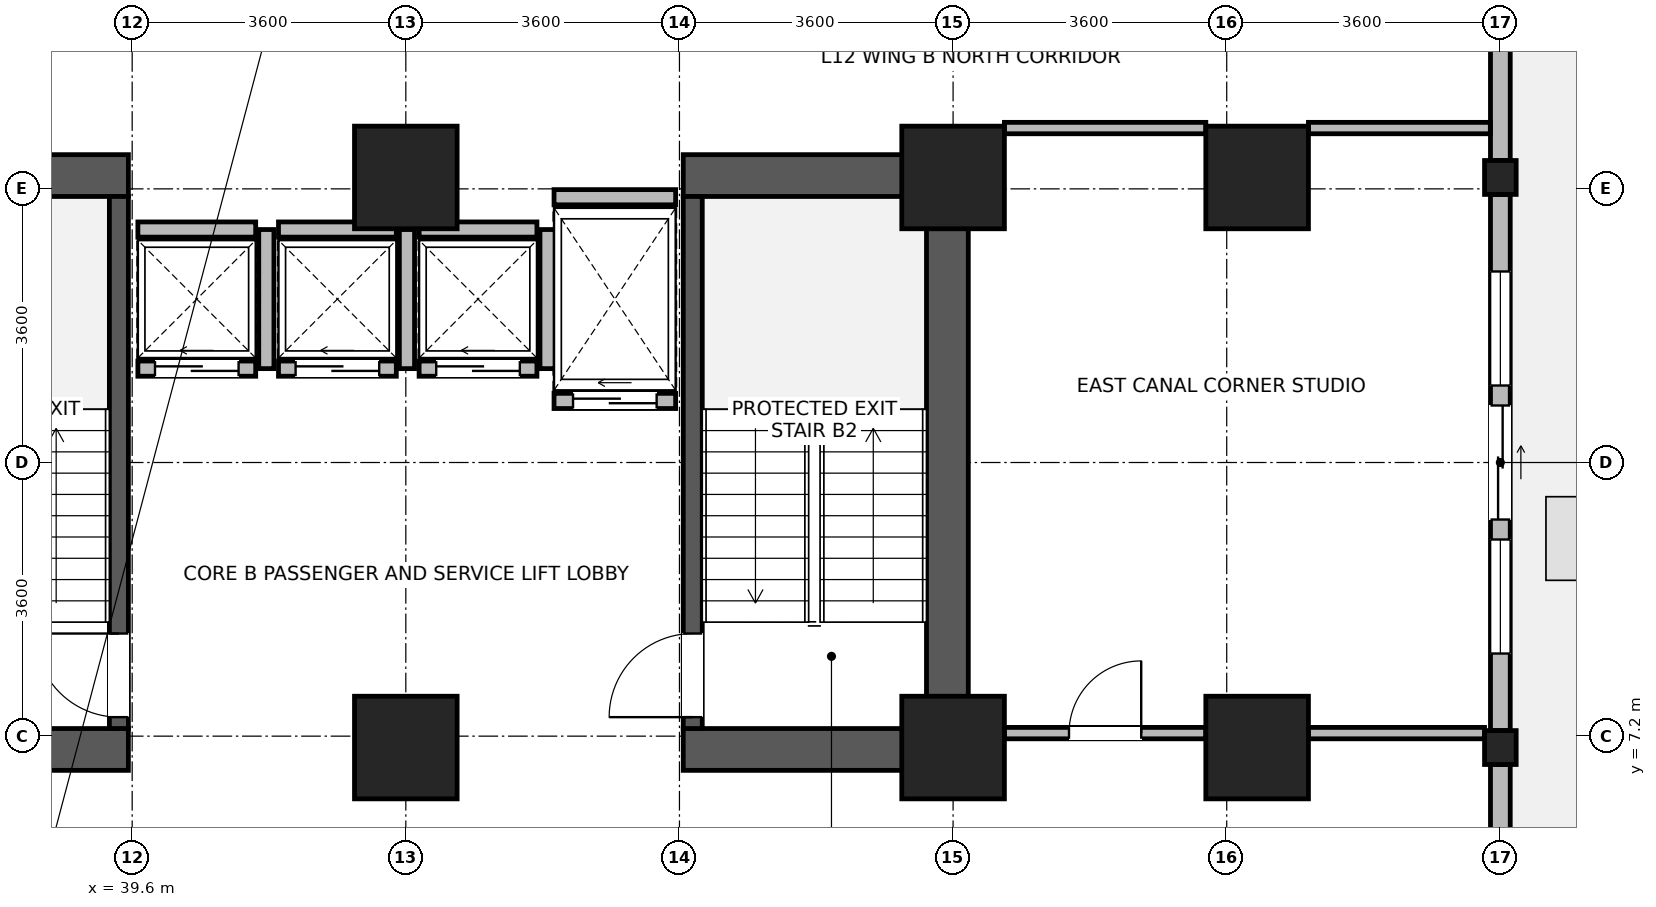
"""IFC4 building model, lengths in metres.
Left out: names, types, materials, properties, quantities, classifications, styles, units other than length and angle.
Written with IfcOpenShell. Run it as: python <this file> out.ifc"""

import sys

from ifc_helpers import new_model, si_unit, direction, frame, frame_2d, origin, origin_2d, place, context, subcontext, project, spatial, rectangle, i_section, extrude, source, transform, mapped, element, fill, save


model = new_model("IFC4")
c1 = context("Model", 3, precision=1e-05, world=origin(), true_north=direction((0.0, 1.0)))
c2 = subcontext(c1, "Body", "Model", "MODEL_VIEW")
j1 = project(units=[si_unit("LENGTHUNIT", "METRE"), si_unit("PLANEANGLEUNIT", "RADIAN")], contexts=[c1])
p1 = place(None, origin())
s1 = spatial("IfcSite", under=j1, at=p1, CompositionType="ELEMENT")
p2 = place(p1, origin())
s2 = spatial("IfcBuilding", under=s1, at=p2, CompositionType="ELEMENT")
p3 = place(p2, frame((0.0, 0.0, 51.2)))
s3 = spatial("IfcBuildingStorey", under=s2, at=p3, CompositionType="ELEMENT", Elevation=51.2)
p4 = place(p3, frame((50.325, 6.75, 0.0), z_axis=(0.0, 0.0, 1.0), x_axis=(0.0, 1.0, 0.0)))
e1 = element("IfcWall", 1, at=p4, inside=s3, PredefinedType="SHEAR", context=c2, shape_type="SweptSolid", body=[
    extrude(rectangle(XDim=8.1, YDim=0.55, at=frame_2d((4.05, 0.0))), origin(), (0.0, 0.0, 1.0), 3.45),
])
for number, where, z_axis, x_axis in (
    (2, (36.35, 7.025, 0.0), (0.0, 0.0, 1.0), (1.0, 0.0, 0.0)),
    (3, (46.85, 7.025, 0.0), (0.0, 0.0, 1.0), (1.0, 0.0, 0.0)),
    (4, (36.35, 14.575, 0.0), (0.0, 0.0, 1.0), (1.0, 0.0, 0.0)),
    (5, (46.85, 14.575, 0.0), (0.0, 0.0, 1.0), (1.0, 0.0, 0.0)),
):
    element("IfcWall", number, at=place(p3, frame(where, z_axis=z_axis, x_axis=x_axis)), inside=s3, PredefinedType="SHEAR", context=c2, shape_type="SweptSolid", body=[
        extrude(rectangle(XDim=3.2, YDim=0.55, at=frame_2d((1.6, 0.0))), origin(), (0.0, 0.0, 1.0), 3.45),
    ])
p5 = place(p3, frame((39.425, 7.3, 0.0), z_axis=(0.0, 0.0, 1.0), x_axis=(0.0, 1.0, 0.0)))
e6 = element("IfcWall", 6, at=p5, inside=s3, PredefinedType="SHEAR", context=c2, shape_type="SweptSolid", body=[
    extrude(rectangle(XDim=7.0, YDim=0.25, at=frame_2d((3.5, 0.0))), origin(), (0.0, 0.0, 1.0), 3.45),
])
p6 = place(p5, frame((0.15, 0.0, 0.0)))
e7 = element("IfcOpeningElement", 7, at=p6, cuts=e6, PredefinedType="OPENING", context=c2, shape_type="SweptSolid", body=[
    extrude(rectangle(XDim=1.1, YDim=2.08, at=frame_2d((0.55, 1.04))), frame((0.0, 0.135, 0.0), z_axis=(0.0, -1.0, 0.0), x_axis=(1.0, 0.0, 0.0)), (0.0, 0.0, 1.0), 0.27),
])
p7 = place(p3, frame((46.975, 7.3, 0.0), z_axis=(0.0, 0.0, 1.0), x_axis=(0.0, 1.0, 0.0)))
e8 = element("IfcWall", 8, at=p7, inside=s3, PredefinedType="SHEAR", context=c2, shape_type="SweptSolid", body=[
    extrude(rectangle(XDim=7.0, YDim=0.25, at=frame_2d((3.5, 0.0))), origin(), (0.0, 0.0, 1.0), 3.45),
])
p8 = place(p7, frame((0.15, 0.0, 0.0)))
e9 = element("IfcOpeningElement", 9, at=p8, cuts=e8, PredefinedType="OPENING", context=c2, shape_type="SweptSolid", body=[
    extrude(rectangle(XDim=1.1, YDim=2.08, at=frame_2d((0.55, 1.04))), frame((0.0, 0.135, 0.0), z_axis=(0.0, -1.0, 0.0), x_axis=(1.0, 0.0, 0.0)), (0.0, 0.0, 1.0), 0.27),
])
m1 = source(origin(), c2, "Body", "SweptSolid", [
    extrude(rectangle(XDim=1.35, YDim=1.35, at=origin_2d()), origin(), (0.0, 0.0, 1.0), 3.7),
])
for number, where, z_axis, x_axis in (
    (10, (43.2, 7.05, 0.0), (0.0, 0.0, 1.0), (1.0, 0.0, 0.0)),
    (11, (43.2, 14.55, 0.0), (0.0, 0.0, 1.0), (1.0, 0.0, 0.0)),
    (12, (50.4, 7.05, 0.0), (0.0, 0.0, 1.0), (1.0, 0.0, 0.0)),
    (13, (50.4, 14.55, 0.0), (0.0, 0.0, 1.0), (1.0, 0.0, 0.0)),
    (14, (54.4, 7.05, 0.0), (0.0, 0.0, 1.0), (1.0, 0.0, 0.0)),
    (15, (54.4, 14.55, 0.0), (0.0, 0.0, 1.0), (1.0, 0.0, 0.0)),
):
    element("IfcColumn", number, at=place(p3, frame(where, z_axis=z_axis, x_axis=x_axis)), inside=s3, PredefinedType="COLUMN", context=c2, shape_type="MappedRepresentation", body=[
        mapped(m1, transform((0.0, 0.0, 0.0), x_axis=(1.0, 0.0, 0.0), y_axis=(0.0, 1.0, 0.0), z_axis=(0.0, 0.0, 1.0), scale=1.0)),
    ])
m2 = source(origin(), c2, "Body", "SweptSolid", [
    extrude(i_section(OverallWidth=0.416, OverallDepth=0.446, WebThickness=0.029, FlangeThickness=0.04, FilletRadius=0.015, at=origin_2d()), origin(), (0.0, 0.0, 1.0), 3.7),
])
for number, where, z_axis, x_axis in (
    (16, (57.6, 7.05, 0.0), (0.0, 0.0, 1.0), (1.0, 0.0, 0.0)),
    (17, (57.6, 14.55, 0.0), (0.0, 0.0, 1.0), (1.0, 0.0, 0.0)),
):
    element("IfcColumn", number, at=place(p3, frame(where, z_axis=z_axis, x_axis=x_axis)), inside=s3, PredefinedType="COLUMN", context=c2, shape_type="MappedRepresentation", body=[
        mapped(m2, transform((0.0, 0.0, 0.0), x_axis=(1.0, 0.0, 0.0), y_axis=(0.0, 1.0, 0.0), z_axis=(0.0, 0.0, 1.0), scale=1.0)),
    ])
p9 = place(p3, frame((57.6, 6.826, 0.0), z_axis=(0.0, 0.0, 1.0), x_axis=(0.0, -1.0, 0.0)))
e18 = element("IfcWall", 18, at=p9, inside=s3, PredefinedType="STANDARD", context=c2, shape_type="SweptSolid", body=[
    extrude(rectangle(XDim=2.156, YDim=0.26, at=frame_2d((1.078, 0.0))), origin(), (0.0, 0.0, 1.0), 3.43),
])
p10 = place(p3, frame((57.6, 14.326, 0.0), z_axis=(0.0, 0.0, 1.0), x_axis=(0.0, -1.0, 0.0)))
e19 = element("IfcWall", 19, at=p10, inside=s3, PredefinedType="STANDARD", context=c2, shape_type="SweptSolid", body=[
    extrude(rectangle(XDim=7.052, YDim=0.26, at=frame_2d((3.526, 0.0))), origin(), (0.0, 0.0, 1.0), 2.93),
])
p11 = place(p10, frame((2.776, 0.0, 0.0)))
e20 = element("IfcOpeningElement", 20, at=p11, cuts=e19, PredefinedType="OPENING", context=c2, shape_type="SweptSolid", body=[
    extrude(rectangle(XDim=1.5, YDim=2.15, at=frame_2d((0.75, 1.075))), frame((0.0, 0.14, 0.0), z_axis=(0.0, -1.0, 0.0), x_axis=(1.0, 0.0, 0.0)), (0.0, 0.0, 1.0), 0.28),
])
p12 = place(p10, frame((1.013, 0.0, 0.85)))
e21 = element("IfcOpeningElement", 21, at=p12, cuts=e19, PredefinedType="OPENING", context=c2, shape_type="SweptSolid", body=[
    extrude(rectangle(XDim=1.5, YDim=1.85, at=frame_2d((0.75, 0.925))), frame((0.0, 0.14, 0.0), z_axis=(0.0, -1.0, 0.0), x_axis=(1.0, 0.0, 0.0)), (0.0, 0.0, 1.0), 0.28),
])
p13 = place(p10, frame((4.539, 0.0, 0.85)))
e22 = element("IfcOpeningElement", 22, at=p13, cuts=e19, PredefinedType="OPENING", context=c2, shape_type="SweptSolid", body=[
    extrude(rectangle(XDim=1.5, YDim=1.85, at=frame_2d((0.75, 0.925))), frame((0.0, 0.14, 0.0), z_axis=(0.0, -1.0, 0.0), x_axis=(1.0, 0.0, 0.0)), (0.0, 0.0, 1.0), 0.28),
])
p14 = place(p3, frame((57.6, 21.376, 0.0), z_axis=(0.0, 0.0, 1.0), x_axis=(0.0, -1.0, 0.0)))
e23 = element("IfcWall", 23, at=p14, inside=s3, PredefinedType="STANDARD", context=c2, shape_type="SweptSolid", body=[
    extrude(rectangle(XDim=6.602, YDim=0.26, at=frame_2d((3.301, 0.0))), origin(), (0.0, 0.0, 1.0), 2.93),
])
p15 = place(p14, frame((0.9, 0.0, 0.85)))
e24 = element("IfcOpeningElement", 24, at=p15, cuts=e23, PredefinedType="OPENING", context=c2, shape_type="SweptSolid", body=[
    extrude(rectangle(XDim=1.5, YDim=1.85, at=frame_2d((0.75, 0.925))), frame((0.0, 0.14, 0.0), z_axis=(0.0, -1.0, 0.0), x_axis=(1.0, 0.0, 0.0)), (0.0, 0.0, 1.0), 0.28),
])
p16 = place(p14, frame((2.826, 0.0, 0.85)))
e25 = element("IfcOpeningElement", 25, at=p16, cuts=e23, PredefinedType="OPENING", context=c2, shape_type="SweptSolid", body=[
    extrude(rectangle(XDim=0.95, YDim=1.75, at=frame_2d((0.475, 0.875))), frame((0.0, 0.14, 0.0), z_axis=(0.0, -1.0, 0.0), x_axis=(1.0, 0.0, 0.0)), (0.0, 0.0, 1.0), 0.28),
])
p17 = place(p3, frame((39.675, 12.035, 0.0), z_axis=(0.0, 0.0, 1.0), x_axis=(1.0, 0.0, 0.0)))
e26 = element("IfcWall", 26, at=p17, inside=s3, PredefinedType="PARTITIONING", context=c2, shape_type="SweptSolid", body=[
    extrude(rectangle(XDim=1.55, YDim=0.2, at=frame_2d((0.775, 0.0))), origin(), (0.0, 0.0, 1.0), 3.43),
])
p18 = place(p17, frame((0.225, 0.0, 0.0)))
e27 = element("IfcOpeningElement", 27, at=p18, cuts=e26, PredefinedType="OPENING", context=c2, shape_type="SweptSolid", body=[
    extrude(rectangle(XDim=1.1, YDim=2.12, at=frame_2d((0.55, 1.06))), frame((0.0, 0.11, 0.0), z_axis=(0.0, -1.0, 0.0), x_axis=(1.0, 0.0, 0.0)), (0.0, 0.0, 1.0), 0.22),
])
p19 = place(p3, frame((39.675, 13.865, 0.0), z_axis=(0.0, 0.0, 1.0), x_axis=(1.0, 0.0, 0.0)))
e28 = element("IfcWall", 28, at=p19, inside=s3, PredefinedType="PARTITIONING", context=c2, shape_type="SweptSolid", body=[
    extrude(rectangle(XDim=1.55, YDim=0.2, at=frame_2d((0.775, 0.0))), origin(), (0.0, 0.0, 1.0), 3.43),
])
p20 = place(p3, frame((41.365, 12.035, 0.0), z_axis=(0.0, 0.0, 1.0), x_axis=(0.0, 1.0, 0.0)))
e29 = element("IfcWall", 29, at=p20, inside=s3, PredefinedType="PARTITIONING", context=c2, shape_type="SweptSolid", body=[
    extrude(rectangle(XDim=1.83, YDim=0.2, at=frame_2d((0.915, 0.0))), origin(), (0.0, 0.0, 1.0), 3.43),
])
p21 = place(p3, frame((41.525, 12.035, 0.0), z_axis=(0.0, 0.0, 1.0), x_axis=(1.0, 0.0, 0.0)))
e30 = element("IfcWall", 30, at=p21, inside=s3, PredefinedType="PARTITIONING", context=c2, shape_type="SweptSolid", body=[
    extrude(rectangle(XDim=1.55, YDim=0.2, at=frame_2d((0.775, 0.0))), origin(), (0.0, 0.0, 1.0), 3.43),
])
p22 = place(p21, frame((0.225, 0.0, 0.0)))
e31 = element("IfcOpeningElement", 31, at=p22, cuts=e30, PredefinedType="OPENING", context=c2, shape_type="SweptSolid", body=[
    extrude(rectangle(XDim=1.1, YDim=2.12, at=frame_2d((0.55, 1.06))), frame((0.0, 0.11, 0.0), z_axis=(0.0, -1.0, 0.0), x_axis=(1.0, 0.0, 0.0)), (0.0, 0.0, 1.0), 0.22),
])
p23 = place(p3, frame((41.525, 13.865, 0.0), z_axis=(0.0, 0.0, 1.0), x_axis=(1.0, 0.0, 0.0)))
e32 = element("IfcWall", 32, at=p23, inside=s3, PredefinedType="PARTITIONING", context=c2, shape_type="SweptSolid", body=[
    extrude(rectangle(XDim=1.55, YDim=0.2, at=frame_2d((0.775, 0.0))), origin(), (0.0, 0.0, 1.0), 3.43),
])
p24 = place(p3, frame((43.215, 12.035, 0.0), z_axis=(0.0, 0.0, 1.0), x_axis=(0.0, 1.0, 0.0)))
e33 = element("IfcWall", 33, at=p24, inside=s3, PredefinedType="PARTITIONING", context=c2, shape_type="SweptSolid", body=[
    extrude(rectangle(XDim=1.83, YDim=0.2, at=frame_2d((0.915, 0.0))), origin(), (0.0, 0.0, 1.0), 3.43),
])
p25 = place(p3, frame((43.375, 12.035, 0.0), z_axis=(0.0, 0.0, 1.0), x_axis=(1.0, 0.0, 0.0)))
e34 = element("IfcWall", 34, at=p25, inside=s3, PredefinedType="PARTITIONING", context=c2, shape_type="SweptSolid", body=[
    extrude(rectangle(XDim=1.55, YDim=0.2, at=frame_2d((0.775, 0.0))), origin(), (0.0, 0.0, 1.0), 3.43),
])
p26 = place(p25, frame((0.225, 0.0, 0.0)))
e35 = element("IfcOpeningElement", 35, at=p26, cuts=e34, PredefinedType="OPENING", context=c2, shape_type="SweptSolid", body=[
    extrude(rectangle(XDim=1.1, YDim=2.12, at=frame_2d((0.55, 1.06))), frame((0.0, 0.11, 0.0), z_axis=(0.0, -1.0, 0.0), x_axis=(1.0, 0.0, 0.0)), (0.0, 0.0, 1.0), 0.22),
])
p27 = place(p3, frame((43.375, 13.865, 0.0), z_axis=(0.0, 0.0, 1.0), x_axis=(1.0, 0.0, 0.0)))
e36 = element("IfcWall", 36, at=p27, inside=s3, PredefinedType="PARTITIONING", context=c2, shape_type="SweptSolid", body=[
    extrude(rectangle(XDim=1.55, YDim=0.2, at=frame_2d((0.775, 0.0))), origin(), (0.0, 0.0, 1.0), 3.43),
])
p28 = place(p3, frame((45.065, 12.035, 0.0), z_axis=(0.0, 0.0, 1.0), x_axis=(0.0, 1.0, 0.0)))
e37 = element("IfcWall", 37, at=p28, inside=s3, PredefinedType="PARTITIONING", context=c2, shape_type="SweptSolid", body=[
    extrude(rectangle(XDim=1.83, YDim=0.2, at=frame_2d((0.915, 0.0))), origin(), (0.0, 0.0, 1.0), 3.43),
])
p29 = place(p3, frame((45.15, 11.61, 0.0), z_axis=(0.0, 0.0, 1.0), x_axis=(1.0, 0.0, 0.0)))
e38 = element("IfcWall", 38, at=p29, inside=s3, PredefinedType="PARTITIONING", context=c2, shape_type="SweptSolid", body=[
    extrude(rectangle(XDim=1.6, YDim=0.2, at=frame_2d((0.8, 0.0))), origin(), (0.0, 0.0, 1.0), 3.43),
])
p30 = place(p29, frame((0.25, 0.0, 0.0)))
e39 = element("IfcOpeningElement", 39, at=p30, cuts=e38, PredefinedType="OPENING", context=c2, shape_type="SweptSolid", body=[
    extrude(rectangle(XDim=1.1, YDim=2.12, at=frame_2d((0.55, 1.06))), frame((0.0, 0.11, 0.0), z_axis=(0.0, -1.0, 0.0), x_axis=(1.0, 0.0, 0.0)), (0.0, 0.0, 1.0), 0.22),
])
p31 = place(p3, frame((45.15, 14.29, 0.0), z_axis=(0.0, 0.0, 1.0), x_axis=(1.0, 0.0, 0.0)))
e40 = element("IfcWall", 40, at=p31, inside=s3, PredefinedType="PARTITIONING", context=c2, shape_type="SweptSolid", body=[
    extrude(rectangle(XDim=1.6, YDim=0.2, at=frame_2d((0.8, 0.0))), origin(), (0.0, 0.0, 1.0), 2.23),
])
p32 = place(p3, frame((51.075, 7.24, 0.0), z_axis=(0.0, 0.0, 1.0), x_axis=(1.0, 0.0, 0.0)))
e41 = element("IfcWall", 41, at=p32, inside=s3, PredefinedType="PARTITIONING", context=c2, shape_type="SweptSolid", body=[
    extrude(rectangle(XDim=2.65, YDim=0.15, at=frame_2d((1.325, 0.0))), origin(), (0.0, 0.0, 1.0), 2.78),
])
p33 = place(p32, frame((0.85, 0.0, 0.0)))
e42 = element("IfcOpeningElement", 42, at=p33, cuts=e41, PredefinedType="OPENING", context=c2, shape_type="SweptSolid", body=[
    extrude(rectangle(XDim=0.95, YDim=2.1, at=frame_2d((0.475, 1.05))), frame((0.0, 0.085, 0.0), z_axis=(0.0, -1.0, 0.0), x_axis=(1.0, 0.0, 0.0)), (0.0, 0.0, 1.0), 0.17),
])
p34 = place(p3, frame((55.075, 7.24, 0.0), z_axis=(0.0, 0.0, 1.0), x_axis=(1.0, 0.0, 0.0)))
e43 = element("IfcWall", 43, at=p34, inside=s3, PredefinedType="PARTITIONING", context=c2, shape_type="SweptSolid", body=[
    extrude(rectangle(XDim=2.317, YDim=0.15, at=frame_2d((1.159, 0.0))), origin(), (0.0, 0.0, 1.0), 2.78),
])
p35 = place(p3, frame((51.075, 15.2, 0.0), z_axis=(0.0, 0.0, 1.0), x_axis=(1.0, 0.0, 0.0)))
e44 = element("IfcWall", 44, at=p35, inside=s3, PredefinedType="PARTITIONING", context=c2, shape_type="SweptSolid", body=[
    extrude(rectangle(XDim=2.65, YDim=0.15, at=frame_2d((1.325, 0.0))), origin(), (0.0, 0.0, 1.0), 3.43),
])
p36 = place(p3, frame((55.075, 15.2, 0.0), z_axis=(0.0, 0.0, 1.0), x_axis=(1.0, 0.0, 0.0)))
e45 = element("IfcWall", 45, at=p36, inside=s3, PredefinedType="PARTITIONING", context=c2, shape_type="SweptSolid", body=[
    extrude(rectangle(XDim=2.393, YDim=0.15, at=frame_2d((1.197, 0.0))), origin(), (0.0, 0.0, 1.0), 3.43),
])
p37 = place(p11, origin())
e46 = element("IfcDoor", 46, at=p37, inside=s3, OperationType="SLIDING_TO_LEFT", PredefinedType="DOOR", context=c2, shape_type="SweptSolid", body=[
    extrude(rectangle(XDim=1.5, YDim=2.15, at=frame_2d((0.75, 1.075))), frame((0.0, 0.025, 0.0), z_axis=(0.0, -1.0, 0.0), x_axis=(1.0, 0.0, 0.0)), (0.0, 0.0, 1.0), 0.05),
])
fill(e20, e46)
p38 = place(p12, origin())
e47 = element("IfcWindow", 47, at=p38, inside=s3, PartitioningType="SINGLE_PANEL", PredefinedType="WINDOW", context=c2, shape_type="SweptSolid", body=[
    extrude(rectangle(XDim=1.5, YDim=1.85, at=frame_2d((0.75, 0.925))), frame((0.0, 0.03, 0.0), z_axis=(0.0, -1.0, 0.0), x_axis=(1.0, 0.0, 0.0)), (0.0, 0.0, 1.0), 0.06),
])
fill(e21, e47)
p39 = place(p13, origin())
e48 = element("IfcWindow", 48, at=p39, inside=s3, PartitioningType="SINGLE_PANEL", PredefinedType="WINDOW", context=c2, shape_type="SweptSolid", body=[
    extrude(rectangle(XDim=1.5, YDim=1.85, at=frame_2d((0.75, 0.925))), frame((0.0, 0.03, 0.0), z_axis=(0.0, -1.0, 0.0), x_axis=(1.0, 0.0, 0.0)), (0.0, 0.0, 1.0), 0.06),
])
fill(e22, e48)
p40 = place(p6, origin())
e49 = element("IfcDoor", 49, at=p40, inside=s3, OperationType="SINGLE_SWING_RIGHT", PredefinedType="DOOR", context=c2, shape_type="SweptSolid", body=[
    extrude(rectangle(XDim=1.1, YDim=2.08, at=frame_2d((0.55, 1.04))), frame((0.0, 0.025, 0.0), z_axis=(0.0, -1.0, 0.0), x_axis=(1.0, 0.0, 0.0)), (0.0, 0.0, 1.0), 0.05),
])
fill(e7, e49)
p41 = place(p8, origin())
e50 = element("IfcDoor", 50, at=p41, inside=s3, OperationType="SINGLE_SWING_LEFT", PredefinedType="DOOR", context=c2, shape_type="SweptSolid", body=[
    extrude(rectangle(XDim=1.1, YDim=2.08, at=frame_2d((0.55, 1.04))), frame((0.0, 0.025, 0.0), z_axis=(0.0, -1.0, 0.0), x_axis=(1.0, 0.0, 0.0)), (0.0, 0.0, 1.0), 0.05),
])
fill(e9, e50)
p42 = place(p18, origin())
e51 = element("IfcDoor", 51, at=p42, inside=s3, OperationType="SLIDING_TO_LEFT", PredefinedType="DOOR", context=c2, shape_type="SweptSolid", body=[
    extrude(rectangle(XDim=1.1, YDim=2.12, at=frame_2d((0.55, 1.06))), frame((0.0, 0.025, 0.0), z_axis=(0.0, -1.0, 0.0), x_axis=(1.0, 0.0, 0.0)), (0.0, 0.0, 1.0), 0.05),
])
fill(e27, e51)
p43 = place(p22, origin())
e52 = element("IfcDoor", 52, at=p43, inside=s3, OperationType="SLIDING_TO_LEFT", PredefinedType="DOOR", context=c2, shape_type="SweptSolid", body=[
    extrude(rectangle(XDim=1.1, YDim=2.12, at=frame_2d((0.55, 1.06))), frame((0.0, 0.025, 0.0), z_axis=(0.0, -1.0, 0.0), x_axis=(1.0, 0.0, 0.0)), (0.0, 0.0, 1.0), 0.05),
])
fill(e31, e52)
p44 = place(p26, origin())
e53 = element("IfcDoor", 53, at=p44, inside=s3, OperationType="SLIDING_TO_LEFT", PredefinedType="DOOR", context=c2, shape_type="SweptSolid", body=[
    extrude(rectangle(XDim=1.1, YDim=2.12, at=frame_2d((0.55, 1.06))), frame((0.0, 0.025, 0.0), z_axis=(0.0, -1.0, 0.0), x_axis=(1.0, 0.0, 0.0)), (0.0, 0.0, 1.0), 0.05),
])
fill(e35, e53)
p45 = place(p30, origin())
e54 = element("IfcDoor", 54, at=p45, inside=s3, OperationType="SLIDING_TO_LEFT", PredefinedType="DOOR", context=c2, shape_type="SweptSolid", body=[
    extrude(rectangle(XDim=1.1, YDim=2.12, at=frame_2d((0.55, 1.06))), frame((0.0, 0.025, 0.0), z_axis=(0.0, -1.0, 0.0), x_axis=(1.0, 0.0, 0.0)), (0.0, 0.0, 1.0), 0.05),
])
fill(e39, e54)
p46 = place(p33, origin())
e55 = element("IfcDoor", 55, at=p46, inside=s3, OperationType="SINGLE_SWING_RIGHT", PredefinedType="DOOR", context=c2, shape_type="SweptSolid", body=[
    extrude(rectangle(XDim=0.95, YDim=2.1, at=frame_2d((0.475, 1.05))), frame((0.0, 0.025, 0.0), z_axis=(0.0, -1.0, 0.0), x_axis=(1.0, 0.0, 0.0)), (0.0, 0.0, 1.0), 0.05),
])
fill(e42, e55)
save(model, sys.argv[1])
